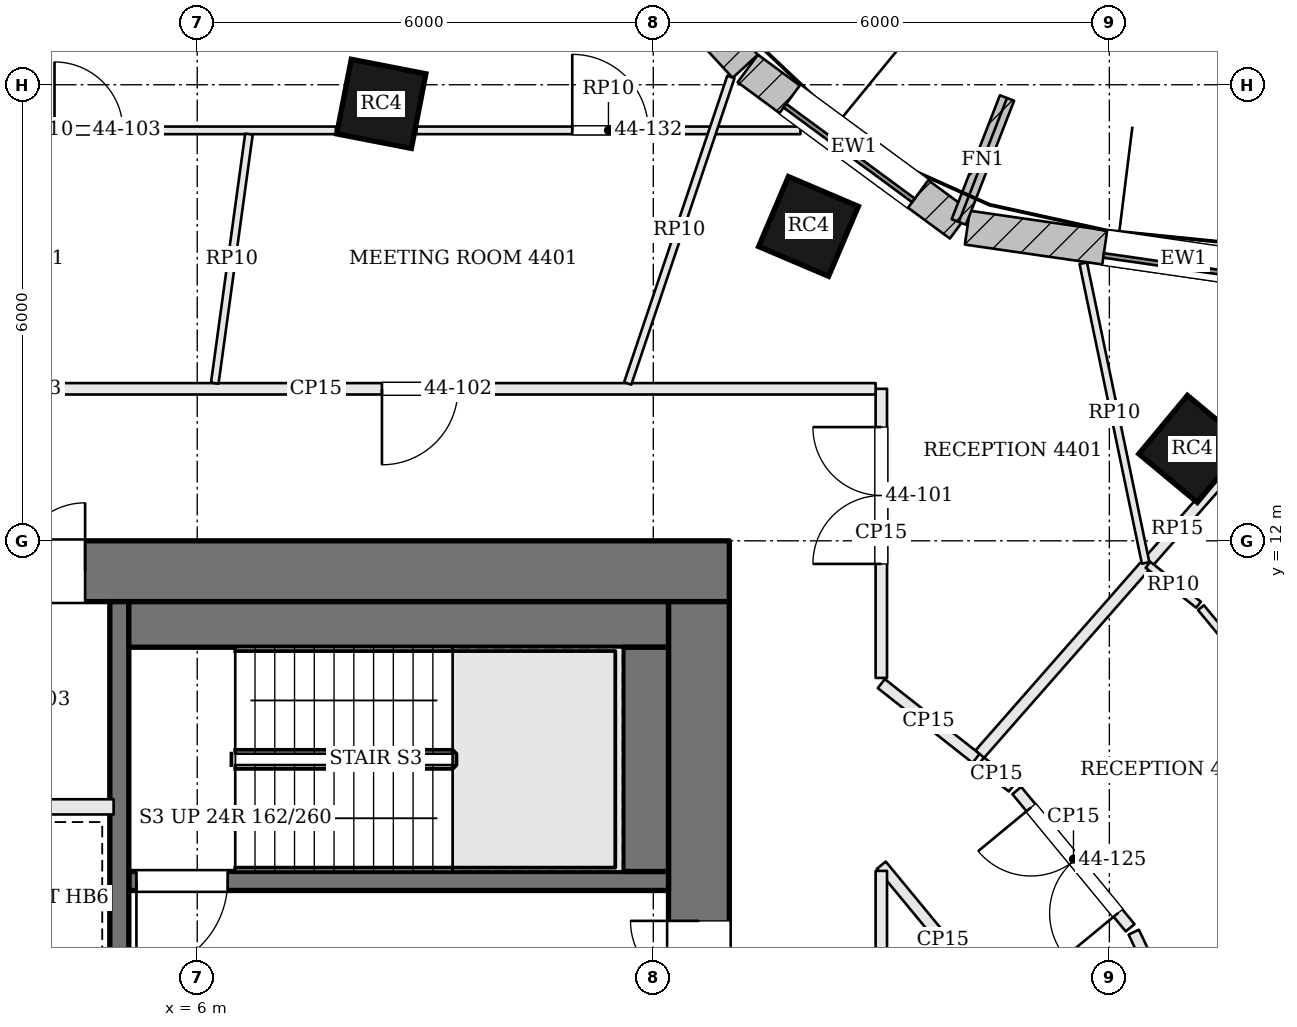
"""IFC4 building model, lengths in metres.
Left out: names, types, materials, properties, quantities, classifications, styles, units other than length and angle.
Written with IfcOpenShell. Run it as: python <this file> out.ifc"""

import sys

from ifc_helpers import new_model, si_unit, direction, frame, frame_2d, origin, origin_2d, place, context, subcontext, project, spatial, rectangle, extrude, element, fill, save


model = new_model("IFC4")
c1 = context("Model", 3, precision=1e-05, world=origin(), true_north=direction((0.0, 1.0)))
c2 = subcontext(c1, "Body", "Model", "MODEL_VIEW")
j1 = project(units=[si_unit("LENGTHUNIT", "METRE"), si_unit("PLANEANGLEUNIT", "RADIAN")], contexts=[c1])
p1 = place(None, origin())
s1 = spatial("IfcSite", under=j1, at=p1, CompositionType="ELEMENT")
p2 = place(p1, origin())
s2 = spatial("IfcBuilding", under=s1, at=p2, CompositionType="ELEMENT")
p3 = place(p2, frame((0.0, 0.0, 181.8)))
s3 = spatial("IfcBuildingStorey", under=s2, at=p3, CompositionType="ELEMENT", Elevation=181.8)
p4 = place(p3, frame((-13.0, 11.6, 0.0), z_axis=(0.0, 0.0, 1.0), x_axis=(1.0, 0.0, 0.0)))
e1 = element("IfcWall", 1, at=p4, inside=s3, PredefinedType="SHEAR", context=c2, shape_type="SweptSolid", body=[
    extrude(rectangle(XDim=26.0, YDim=0.8, at=frame_2d((13.0, 0.0))), origin(), (0.0, 0.0, 1.0), 3.9),
])
p5 = place(p4, frame((9.375, 0.0, 0.0)))
e2 = element("IfcOpeningElement", 2, at=p5, cuts=e1, PredefinedType="OPENING", context=c2, shape_type="SweptSolid", body=[
    extrude(rectangle(XDim=0.7, YDim=2.1, at=frame_2d((0.35, 1.05))), frame((0.0, 0.41, 0.0), z_axis=(0.0, -1.0, 0.0), x_axis=(1.0, 0.0, 0.0)), (0.0, 0.0, 1.0), 0.82),
])
p6 = place(p4, frame((12.075, 0.0, 0.0)))
e3 = element("IfcOpeningElement", 3, at=p6, cuts=e1, PredefinedType="OPENING", context=c2, shape_type="SweptSolid", body=[
    extrude(rectangle(XDim=1.0, YDim=2.1, at=frame_2d((0.5, 1.05))), frame((0.0, 0.41, 0.0), z_axis=(0.0, -1.0, 0.0), x_axis=(1.0, 0.0, 0.0)), (0.0, 0.0, 1.0), 0.82),
])
p7 = place(p4, frame((14.675, 0.0, 0.0)))
e4 = element("IfcOpeningElement", 4, at=p7, cuts=e1, PredefinedType="OPENING", context=c2, shape_type="SweptSolid", body=[
    extrude(rectangle(XDim=0.7, YDim=2.1, at=frame_2d((0.35, 1.05))), frame((0.0, 0.41, 0.0), z_axis=(0.0, -1.0, 0.0), x_axis=(1.0, 0.0, 0.0)), (0.0, 0.0, 1.0), 0.82),
])
p8 = place(p4, frame((16.625, 0.0, 0.0)))
e5 = element("IfcOpeningElement", 5, at=p8, cuts=e1, PredefinedType="OPENING", context=c2, shape_type="SweptSolid", body=[
    extrude(rectangle(XDim=0.9, YDim=2.1, at=frame_2d((0.45, 1.05))), frame((0.0, 0.41, 0.0), z_axis=(0.0, -1.0, 0.0), x_axis=(1.0, 0.0, 0.0)), (0.0, 0.0, 1.0), 0.82),
])
p9 = place(p3, frame((12.6, -2.2, 0.0), z_axis=(0.0, 0.0, 1.0), x_axis=(0.0, 1.0, 0.0)))
e6 = element("IfcWall", 6, at=p9, inside=s3, PredefinedType="SHEAR", context=c2, shape_type="SweptSolid", body=[
    extrude(rectangle(XDim=13.4, YDim=0.8, at=frame_2d((6.7, 0.0))), origin(), (0.0, 0.0, 1.0), 3.9),
])
p10 = place(p9, frame((7.4, 0.0, 0.0)))
e7 = element("IfcOpeningElement", 7, at=p10, cuts=e6, PredefinedType="OPENING", context=c2, shape_type="SweptSolid", body=[
    extrude(rectangle(XDim=1.8, YDim=2.1, at=frame_2d((0.9, 1.05))), frame((0.0, 0.41, 0.0), z_axis=(0.0, -1.0, 0.0), x_axis=(1.0, 0.0, 0.0)), (0.0, 0.0, 1.0), 0.82),
])
for number, where, z_axis, x_axis in (
    (8, (19.092, 13.209, 0.0), (0.0, 0.0, 1.0), (-0.769, 0.639, 0.0)),
    (9, (14.042, 16.136, 0.0), (0.0, 0.0, 1.0), (-0.92, 0.392, 0.0)),
    (10, (8.422, 17.749, 0.0), (0.0, 0.0, 1.0), (-0.982, 0.191, 0.0)),
):
    element("IfcColumn", number, at=place(p3, frame(where, z_axis=z_axis, x_axis=x_axis)), inside=s3, PredefinedType="COLUMN", context=c2, shape_type="SweptSolid", body=[
        extrude(rectangle(XDim=1.0, YDim=1.0, at=origin_2d()), origin(), (0.0, 0.0, 1.0), 3.9),
    ])
p11 = place(p3, frame((21.825, 15.297, 0.0), z_axis=(0.0, 0.0, 1.0), x_axis=(-0.98971474215, 0.143054986527, 0.0)))
e11 = element("IfcWall", 11, at=p11, inside=s3, PredefinedType="SOLIDWALL", context=c2, shape_type="SweptSolid", body=[
    extrude(rectangle(XDim=5.753, YDim=0.45, at=frame_2d((2.876, 0.0))), origin(), (0.0, 0.0, 1.0), 3.7),
])
p12 = place(p11, frame((1.826, 0.0, 0.9)))
e12 = element("IfcOpeningElement", 12, at=p12, cuts=e11, PredefinedType="OPENING", context=c2, shape_type="SweptSolid", body=[
    extrude(rectangle(XDim=2.1, YDim=2.3, at=frame_2d((1.05, 1.15))), frame((0.0, 0.235, 0.0), z_axis=(0.0, -1.0, 0.0), x_axis=(1.0, 0.0, 0.0)), (0.0, 0.0, 1.0), 0.47),
])
p13 = place(p3, frame((16.036, 16.158, 0.0), z_axis=(0.0, 0.0, 1.0), x_axis=(-0.805181432967, 0.593028549064, 0.0)))
e13 = element("IfcWall", 13, at=p13, inside=s3, PredefinedType="SOLIDWALL", context=c2, shape_type="SweptSolid", body=[
    extrude(rectangle(XDim=3.469, YDim=0.45, at=frame_2d((1.734, 0.0))), origin(), (0.0, 0.0, 1.0), 3.7),
])
p14 = place(p13, frame((0.684, 0.0, 0.9)))
e14 = element("IfcOpeningElement", 14, at=p14, cuts=e13, PredefinedType="OPENING", context=c2, shape_type="SweptSolid", body=[
    extrude(rectangle(XDim=2.1, YDim=2.3, at=frame_2d((1.05, 1.15))), frame((0.0, 0.235, 0.0), z_axis=(0.0, -1.0, 0.0), x_axis=(1.0, 0.0, 0.0)), (0.0, 0.0, 1.0), 0.47),
])
p15 = place(p3, frame((13.209, 18.243, 0.0), z_axis=(0.0, 0.0, 1.0), x_axis=(-0.677612152497, 0.735419452278, 0.0)))
e15 = element("IfcWall", 15, at=p15, inside=s3, PredefinedType="SOLIDWALL", context=c2, shape_type="SweptSolid", body=[
    extrude(rectangle(XDim=3.797, YDim=0.45, at=frame_2d((1.898, 0.0))), origin(), (0.0, 0.0, 1.0), 3.7),
])
p16 = place(p15, frame((0.848, 0.0, 0.9)))
e16 = element("IfcOpeningElement", 16, at=p16, cuts=e15, PredefinedType="OPENING", context=c2, shape_type="SweptSolid", body=[
    extrude(rectangle(XDim=2.1, YDim=2.3, at=frame_2d((1.05, 1.15))), frame((0.0, 0.235, 0.0), z_axis=(0.0, -1.0, 0.0), x_axis=(1.0, 0.0, 0.0)), (0.0, 0.0, 1.0), 0.47),
])
p17 = place(p3, frame((16.019, 16.195, 0.0), z_axis=(0.0, 0.0, 1.0), x_axis=(0.362641522028, 0.931928713208, 0.0)))
e17 = element("IfcWall", 17, at=p17, inside=s3, PredefinedType="SOLIDWALL", context=c2, shape_type="SweptSolid", body=[
    extrude(rectangle(XDim=1.75, YDim=0.2, at=frame_2d((0.875, 0.0))), origin(), (0.0, 0.0, 1.0), 3.7),
])
p18 = place(p3, frame((12.2, 7.525, 0.0), z_axis=(0.0, 0.0, 1.0), x_axis=(-1.0, 0.0, 0.0)))
e18 = element("IfcWall", 18, at=p18, inside=s3, PredefinedType="SOLIDWALL", context=c2, shape_type="SweptSolid", body=[
    extrude(rectangle(XDim=7.1, YDim=0.25, at=frame_2d((3.55, 0.0))), origin(), (0.0, 0.0, 1.0), 3.7),
])
p19 = place(p18, frame((5.8, 0.0, 0.0)))
e19 = element("IfcOpeningElement", 19, at=p19, cuts=e18, PredefinedType="OPENING", context=c2, shape_type="SweptSolid", body=[
    extrude(rectangle(XDim=1.2, YDim=2.1, at=frame_2d((0.6, 1.05))), frame((0.0, 0.135, 0.0), z_axis=(0.0, -1.0, 0.0), x_axis=(1.0, 0.0, 0.0)), (0.0, 0.0, 1.0), 0.27),
])
p20 = place(p3, frame((4.975, 11.2, 0.0), z_axis=(0.0, 0.0, 1.0), x_axis=(0.0, -1.0, 0.0)))
e20 = element("IfcWall", 20, at=p20, inside=s3, PredefinedType="SOLIDWALL", context=c2, shape_type="SweptSolid", body=[
    extrude(rectangle(XDim=13.4, YDim=0.25, at=frame_2d((6.7, 0.0))), origin(), (0.0, 0.0, 1.0), 3.7),
])
p21 = place(p20, frame((5.25, 0.0, 0.0)))
e21 = element("IfcOpeningElement", 21, at=p21, cuts=e20, PredefinedType="OPENING", context=c2, shape_type="SweptSolid", body=[
    extrude(rectangle(XDim=1.2, YDim=2.1, at=frame_2d((0.6, 1.05))), frame((0.0, 0.135, 0.0), z_axis=(0.0, -1.0, 0.0), x_axis=(1.0, 0.0, 0.0)), (0.0, 0.0, 1.0), 0.27),
])
p22 = place(p3, frame((12.2, 10.9, 0.0), z_axis=(0.0, 0.0, 1.0), x_axis=(-1.0, 0.0, 0.0)))
e22 = element("IfcWall", 22, at=p22, inside=s3, PredefinedType="SOLIDWALL", context=c2, shape_type="SweptSolid", body=[
    extrude(rectangle(XDim=7.1, YDim=0.6, at=frame_2d((3.55, 0.0))), origin(), (0.0, 0.0, 1.0), 3.7),
])
p23 = place(p3, frame((11.9, 10.6, 0.0), z_axis=(0.0, 0.0, 1.0), x_axis=(0.0, -1.0, 0.0)))
e23 = element("IfcWall", 23, at=p23, inside=s3, PredefinedType="SOLIDWALL", context=c2, shape_type="SweptSolid", body=[
    extrude(rectangle(XDim=2.95, YDim=0.6, at=frame_2d((1.475, 0.0))), origin(), (0.0, 0.0, 1.0), 3.7),
])
p24 = place(p3, frame((-4.9, 8.5, 0.0), z_axis=(0.0, 0.0, 1.0), x_axis=(1.0, 0.0, 0.0)))
e24 = element("IfcWall", 24, at=p24, inside=s3, PredefinedType="SOLIDWALL", context=c2, shape_type="SweptSolid", body=[
    extrude(rectangle(XDim=9.8, YDim=0.2, at=frame_2d((4.9, 0.0))), origin(), (0.0, 0.0, 1.0), 3.7),
])
p25 = place(p3, frame((16.246, 9.138, 0.0), z_axis=(0.0, 0.0, 1.0), x_axis=(-0.785126783061, 0.619335074512, 0.0)))
e25 = element("IfcWall", 25, at=p25, inside=s3, PredefinedType="PARTITIONING", context=c2, shape_type="SweptSolid", body=[
    extrude(rectangle(XDim=1.587, YDim=0.15, at=frame_2d((0.794, 0.0))), origin(), (0.0, 0.0, 1.0), 3.084),
])
p26 = place(p3, frame((15.0, 10.196, 0.0), z_axis=(0.0, 0.0, 1.0), x_axis=(0.0, 1.0, 0.0)))
e26 = element("IfcWall", 26, at=p26, inside=s3, PredefinedType="PARTITIONING", context=c2, shape_type="SweptSolid", body=[
    extrude(rectangle(XDim=3.804, YDim=0.15, at=frame_2d((1.902, 0.0))), origin(), (0.0, 0.0, 1.0), 3.084),
])
p27 = place(p26, frame((1.5, 0.0, 0.0)))
e27 = element("IfcOpeningElement", 27, at=p27, cuts=e26, PredefinedType="OPENING", context=c2, shape_type="SweptSolid", body=[
    extrude(rectangle(XDim=1.8, YDim=2.1, at=frame_2d((0.9, 1.05))), frame((0.0, 0.085, 0.0), z_axis=(0.0, -1.0, 0.0), x_axis=(1.0, 0.0, 0.0)), (0.0, 0.0, 1.0), 0.17),
])
p28 = place(p3, frame((14.925, 14.0, 0.0), z_axis=(0.0, 0.0, 1.0), x_axis=(-1.0, 0.0, 0.0)))
e28 = element("IfcWall", 28, at=p28, inside=s3, PredefinedType="PARTITIONING", context=c2, shape_type="SweptSolid", body=[
    extrude(rectangle(XDim=14.725, YDim=0.15, at=frame_2d((7.362, 0.0))), origin(), (0.0, 0.0, 1.0), 3.084),
])
p29 = place(p28, frame((5.495, 0.0, 0.0)))
e29 = element("IfcOpeningElement", 29, at=p29, cuts=e28, PredefinedType="OPENING", context=c2, shape_type="SweptSolid", body=[
    extrude(rectangle(XDim=1.0, YDim=2.4, at=frame_2d((0.5, 1.2))), frame((0.0, 0.085, 0.0), z_axis=(0.0, -1.0, 0.0), x_axis=(1.0, 0.0, 0.0)), (0.0, 0.0, 1.0), 0.17),
])
p30 = place(p28, frame((11.15, 0.0, 0.0)))
e30 = element("IfcOpeningElement", 30, at=p30, cuts=e28, PredefinedType="OPENING", context=c2, shape_type="SweptSolid", body=[
    extrude(rectangle(XDim=1.0, YDim=2.1, at=frame_2d((0.5, 1.05))), frame((0.0, 0.085, 0.0), z_axis=(0.0, -1.0, 0.0), x_axis=(1.0, 0.0, 0.0)), (0.0, 0.0, 1.0), 0.17),
])
p31 = place(p3, frame((21.493, 15.114, 0.0), z_axis=(0.0, 0.0, 1.0), x_axis=(-0.659778549164, -0.751460089467, 0.0)))
e31 = element("IfcWall", 31, at=p31, inside=s3, PredefinedType="PARTITIONING", context=c2, shape_type="SweptSolid", body=[
    extrude(rectangle(XDim=7.877, YDim=0.15, at=frame_2d((3.938, 0.0))), origin(), (0.0, 0.0, 1.0), 3.234),
])
p32 = place(p3, frame((26.367, 8.789, 0.0), z_axis=(0.0, 0.0, 1.0), x_axis=(-0.913673557468, -0.406448804137, 0.0)))
e32 = element("IfcWall", 32, at=p32, inside=s3, PredefinedType="PARTITIONING", context=c2, shape_type="SweptSolid", body=[
    extrude(rectangle(XDim=8.029, YDim=0.15, at=frame_2d((4.014, 0.0))), origin(), (0.0, 0.0, 1.0), 3.234),
])
p33 = place(p3, frame((18.931, 5.563, 0.0), z_axis=(0.0, 0.0, 1.0), x_axis=(-0.428204145682, 0.903682029046, 0.0)))
e33 = element("IfcWall", 33, at=p33, inside=s3, PredefinedType="PARTITIONING", context=c2, shape_type="SweptSolid", body=[
    extrude(rectangle(XDim=1.425, YDim=0.15, at=frame_2d((0.713, 0.0))), origin(), (0.0, 0.0, 1.0), 3.084),
])
p34 = place(p3, frame((18.273, 6.909, 0.0), z_axis=(0.0, 0.0, 1.0), x_axis=(-0.63653648943, 0.771246586783, 0.0)))
e34 = element("IfcWall", 34, at=p34, inside=s3, PredefinedType="PARTITIONING", context=c2, shape_type="SweptSolid", body=[
    extrude(rectangle(XDim=2.342, YDim=0.15, at=frame_2d((1.171, 0.0))), origin(), (0.0, 0.0, 1.0), 3.084),
])
p35 = place(p34, frame((0.25, 0.0, 0.0)))
e35 = element("IfcOpeningElement", 35, at=p35, cuts=e34, PredefinedType="OPENING", context=c2, shape_type="SweptSolid", body=[
    extrude(rectangle(XDim=1.8, YDim=2.1, at=frame_2d((0.9, 1.05))), frame((0.0, 0.085, 0.0), z_axis=(0.0, -1.0, 0.0), x_axis=(1.0, 0.0, 0.0)), (0.0, 0.0, 1.0), 0.17),
])
p36 = place(p3, frame((16.724, 8.761, 0.0), z_axis=(0.0, 0.0, 1.0), x_axis=(-0.785093642841, 0.619377083827, 0.0)))
e36 = element("IfcWall", 36, at=p36, inside=s3, PredefinedType="PARTITIONING", context=c2, shape_type="SweptSolid", body=[
    extrude(rectangle(XDim=0.533, YDim=0.15, at=frame_2d((0.267, 0.0))), origin(), (0.0, 0.0, 1.0), 3.084),
])
p37 = place(p3, frame((15.0, 7.733, 0.0), z_axis=(0.0, 0.0, 1.0), x_axis=(0.636601263488, -0.771193121938, 0.0)))
e37 = element("IfcWall", 37, at=p37, inside=s3, PredefinedType="PARTITIONING", context=c2, shape_type="SweptSolid", body=[
    extrude(rectangle(XDim=2.545, YDim=0.15, at=frame_2d((1.272, 0.0))), origin(), (0.0, 0.0, 1.0), 3.084),
])
p38 = place(p3, frame((15.0, -4.925, 0.0), z_axis=(0.0, 0.0, 1.0), x_axis=(0.0, 1.0, 0.0)))
e38 = element("IfcWall", 38, at=p38, inside=s3, PredefinedType="PARTITIONING", context=c2, shape_type="SweptSolid", body=[
    extrude(rectangle(XDim=12.583, YDim=0.15, at=frame_2d((6.292, 0.0))), origin(), (0.0, 0.0, 1.0), 3.084),
])
p39 = place(p38, frame((6.441, 0.0, 0.0)))
e39 = element("IfcOpeningElement", 39, at=p39, cuts=e38, PredefinedType="OPENING", context=c2, shape_type="SweptSolid", body=[
    extrude(rectangle(XDim=0.7, YDim=2.1, at=frame_2d((0.35, 1.05))), frame((0.0, 0.085, 0.0), z_axis=(0.0, -1.0, 0.0), x_axis=(1.0, 0.0, 0.0)), (0.0, 0.0, 1.0), 0.17),
])
p40 = place(p3, frame((0.228, 17.4, 0.0), z_axis=(0.0, 0.0, 1.0), x_axis=(1.0, 0.0, 0.0)))
e40 = element("IfcWall", 40, at=p40, inside=s3, PredefinedType="PARTITIONING", context=c2, shape_type="SweptSolid", body=[
    extrude(rectangle(XDim=7.596, YDim=0.1, at=frame_2d((3.798, 0.0))), origin(), (0.0, 0.0, 1.0), 3.084),
])
p41 = place(p40, frame((3.894, 0.0, 0.0)))
e41 = element("IfcOpeningElement", 41, at=p41, cuts=e40, PredefinedType="OPENING", context=c2, shape_type="SweptSolid", body=[
    extrude(rectangle(XDim=0.9, YDim=2.1, at=frame_2d((0.45, 1.05))), frame((0.0, 0.06, 0.0), z_axis=(0.0, -1.0, 0.0), x_axis=(1.0, 0.0, 0.0)), (0.0, 0.0, 1.0), 0.12),
])
p42 = place(p3, frame((8.884, 17.4, 0.0), z_axis=(0.0, 0.0, 1.0), x_axis=(1.0, 0.0, 0.0)))
e42 = element("IfcWall", 42, at=p42, inside=s3, PredefinedType="PARTITIONING", context=c2, shape_type="SweptSolid", body=[
    extrude(rectangle(XDim=5.052, YDim=0.1, at=frame_2d((2.526, 0.0))), origin(), (0.0, 0.0, 1.0), 3.084),
])
p43 = place(p42, frame((2.05, 0.0, 0.0)))
e43 = element("IfcOpeningElement", 43, at=p43, cuts=e42, PredefinedType="OPENING", context=c2, shape_type="SweptSolid", body=[
    extrude(rectangle(XDim=1.0, YDim=2.4, at=frame_2d((0.5, 1.2))), frame((0.0, 0.06, 0.0), z_axis=(0.0, -1.0, 0.0), x_axis=(1.0, 0.0, 0.0)), (0.0, 0.0, 1.0), 0.12),
])
p44 = place(p3, frame((17.656, 15.652, 0.0), z_axis=(0.0, 0.0, 1.0), x_axis=(0.203733969948, -0.979026286414, 0.0)))
e44 = element("IfcWall", 44, at=p44, inside=s3, PredefinedType="PARTITIONING", context=c2, shape_type="SweptSolid", body=[
    extrude(rectangle(XDim=4.028, YDim=0.1, at=frame_2d((2.014, 0.0))), origin(), (0.0, 0.0, 1.0), 3.084),
])
p45 = place(p3, frame((11.664, 14.071, 0.0), z_axis=(0.0, 0.0, 1.0), x_axis=(0.319050122348, 0.947737843198, 0.0)))
e45 = element("IfcWall", 45, at=p45, inside=s3, PredefinedType="PARTITIONING", context=c2, shape_type="SweptSolid", body=[
    extrude(rectangle(XDim=4.254, YDim=0.1, at=frame_2d((2.127, 0.0))), origin(), (0.0, 0.0, 1.0), 3.084),
])
p46 = place(p3, frame((6.231, 14.074, 0.0), z_axis=(0.0, 0.0, 1.0), x_axis=(0.135982862237, 0.990711189589, 0.0)))
e46 = element("IfcWall", 46, at=p46, inside=s3, PredefinedType="PARTITIONING", context=c2, shape_type="SweptSolid", body=[
    extrude(rectangle(XDim=3.307, YDim=0.1, at=frame_2d((1.654, 0.0))), origin(), (0.0, 0.0, 1.0), 3.084),
])
p47 = place(p3, frame((18.508, 11.684, 0.0), z_axis=(0.0, 0.0, 1.0), x_axis=(0.785067093858, -0.619410734603, 0.0)))
e47 = element("IfcWall", 47, at=p47, inside=s3, PredefinedType="PARTITIONING", context=c2, shape_type="SweptSolid", body=[
    extrude(rectangle(XDim=0.847, YDim=0.1, at=frame_2d((0.424, 0.0))), origin(), (0.0, 0.0, 1.0), 3.084),
])
p48 = place(p3, frame((19.206, 11.121, 0.0), z_axis=(0.0, 0.0, 1.0), x_axis=(0.636597206989, -0.771196470462, 0.0)))
e48 = element("IfcWall", 48, at=p48, inside=s3, PredefinedType="PARTITIONING", context=c2, shape_type="SweptSolid", body=[
    extrude(rectangle(XDim=3.152, YDim=0.1, at=frame_2d((1.576, 0.0))), origin(), (0.0, 0.0, 1.0), 3.084),
])
p49 = place(p48, frame((1.619, 0.0, 0.0)))
e49 = element("IfcOpeningElement", 49, at=p49, cuts=e48, PredefinedType="OPENING", context=c2, shape_type="SweptSolid", body=[
    extrude(rectangle(XDim=1.0, YDim=2.1, at=frame_2d((0.5, 1.05))), frame((0.0, 0.06, 0.0), z_axis=(0.0, -1.0, 0.0), x_axis=(1.0, 0.0, 0.0)), (0.0, 0.0, 1.0), 0.12),
])
p50 = place(p12, origin())
e50 = element("IfcWindow", 50, at=p50, inside=s3, PartitioningType="SINGLE_PANEL", PredefinedType="WINDOW", context=c2, shape_type="SweptSolid", body=[
    extrude(rectangle(XDim=2.1, YDim=2.3, at=frame_2d((1.05, 1.15))), frame((0.0, 0.135, 0.0), z_axis=(0.0, -1.0, 0.0), x_axis=(1.0, 0.0, 0.0)), (0.0, 0.0, 1.0), 0.06),
])
fill(e12, e50)
p51 = place(p14, origin())
e51 = element("IfcWindow", 51, at=p51, inside=s3, PartitioningType="SINGLE_PANEL", PredefinedType="WINDOW", context=c2, shape_type="SweptSolid", body=[
    extrude(rectangle(XDim=2.1, YDim=2.3, at=frame_2d((1.05, 1.15))), frame((0.0, 0.135, 0.0), z_axis=(0.0, -1.0, 0.0), x_axis=(1.0, 0.0, 0.0)), (0.0, 0.0, 1.0), 0.06),
])
fill(e14, e51)
p52 = place(p10, origin())
e52 = element("IfcDoor", 52, at=p52, inside=s3, OperationType="DOUBLE_DOOR_SINGLE_SWING", PredefinedType="DOOR", context=c2, shape_type="SweptSolid", body=[
    extrude(rectangle(XDim=1.8, YDim=2.1, at=frame_2d((0.9, 1.05))), frame((0.0, 0.025, 0.0), z_axis=(0.0, -1.0, 0.0), x_axis=(1.0, 0.0, 0.0)), (0.0, 0.0, 1.0), 0.05),
])
fill(e7, e52)
p53 = place(p19, origin())
e53 = element("IfcDoor", 53, at=p53, inside=s3, OperationType="SINGLE_SWING_RIGHT", PredefinedType="DOOR", context=c2, shape_type="SweptSolid", body=[
    extrude(rectangle(XDim=1.2, YDim=2.1, at=frame_2d((0.6, 1.05))), frame((0.0, 0.025, 0.0), z_axis=(0.0, -1.0, 0.0), x_axis=(1.0, 0.0, 0.0)), (0.0, 0.0, 1.0), 0.05),
])
fill(e19, e53)
p54 = place(p8, origin())
e54 = element("IfcDoor", 54, at=p54, inside=s3, OperationType="SINGLE_SWING_RIGHT", PredefinedType="DOOR", context=c2, shape_type="SweptSolid", body=[
    extrude(rectangle(XDim=0.9, YDim=2.1, at=frame_2d((0.45, 1.05))), frame((0.0, 0.025, 0.0), z_axis=(0.0, -1.0, 0.0), x_axis=(1.0, 0.0, 0.0)), (0.0, 0.0, 1.0), 0.05),
])
fill(e5, e54)
p55 = place(p27, origin())
e55 = element("IfcDoor", 55, at=p55, inside=s3, OperationType="DOUBLE_DOOR_SINGLE_SWING", PredefinedType="DOOR", context=c2, shape_type="SweptSolid", body=[
    extrude(rectangle(XDim=1.8, YDim=2.1, at=frame_2d((0.9, 1.05))), frame((0.0, 0.025, 0.0), z_axis=(0.0, -1.0, 0.0), x_axis=(1.0, 0.0, 0.0)), (0.0, 0.0, 1.0), 0.05),
])
fill(e27, e55)
p56 = place(p29, origin())
e56 = element("IfcDoor", 56, at=p56, inside=s3, OperationType="SINGLE_SWING_RIGHT", PredefinedType="DOOR", context=c2, shape_type="SweptSolid", body=[
    extrude(rectangle(XDim=1.0, YDim=2.4, at=frame_2d((0.5, 1.2))), frame((0.0, 0.025, 0.0), z_axis=(0.0, -1.0, 0.0), x_axis=(1.0, 0.0, 0.0)), (0.0, 0.0, 1.0), 0.05),
])
fill(e29, e56)
p57 = place(p41, origin())
e57 = element("IfcDoor", 57, at=p57, inside=s3, OperationType="SINGLE_SWING_LEFT", PredefinedType="DOOR", context=c2, shape_type="SweptSolid", body=[
    extrude(rectangle(XDim=0.9, YDim=2.1, at=frame_2d((0.45, 1.05))), frame((0.0, 0.025, 0.0), z_axis=(0.0, -1.0, 0.0), x_axis=(1.0, 0.0, 0.0)), (0.0, 0.0, 1.0), 0.05),
])
fill(e41, e57)
p58 = place(p35, origin())
e58 = element("IfcDoor", 58, at=p58, inside=s3, OperationType="DOUBLE_DOOR_SINGLE_SWING", PredefinedType="DOOR", context=c2, shape_type="SweptSolid", body=[
    extrude(rectangle(XDim=1.8, YDim=2.1, at=frame_2d((0.9, 1.05))), frame((0.0, 0.025, 0.0), z_axis=(0.0, -1.0, 0.0), x_axis=(1.0, 0.0, 0.0)), (0.0, 0.0, 1.0), 0.05),
])
fill(e35, e58)
p59 = place(p43, origin())
e59 = element("IfcDoor", 59, at=p59, inside=s3, OperationType="SINGLE_SWING_LEFT", PredefinedType="DOOR", context=c2, shape_type="SweptSolid", body=[
    extrude(rectangle(XDim=1.0, YDim=2.4, at=frame_2d((0.5, 1.2))), frame((0.0, 0.025, 0.0), z_axis=(0.0, -1.0, 0.0), x_axis=(1.0, 0.0, 0.0)), (0.0, 0.0, 1.0), 0.05),
])
fill(e43, e59)
save(model, sys.argv[1])
